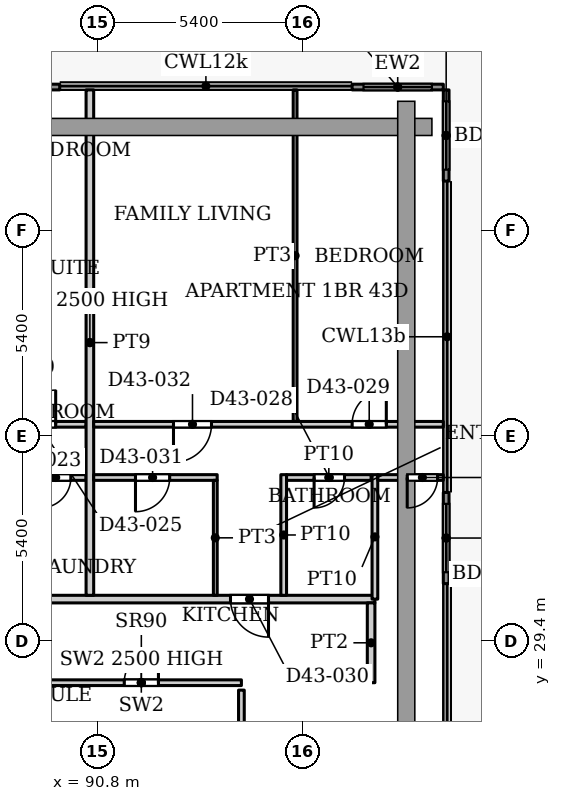
"""IFC4 building model, lengths in metres.
Left out: names, types, materials, properties, quantities, classifications, styles, units other than length and angle.
Written with IfcOpenShell. Run it as: python <this file> out.ifc"""

import sys

from ifc_helpers import new_model, si_unit, direction, frame, frame_2d, origin, place, context, subcontext, project, spatial, rectangle, extrude, source, transform, mapped, element, fill, save


model = new_model("IFC4")
c1 = context("Model", 3, precision=1e-05, world=origin(), true_north=direction((0.0, 1.0)))
c2 = subcontext(c1, "Body", "Model", "MODEL_VIEW")
j1 = project(units=[si_unit("LENGTHUNIT", "METRE"), si_unit("PLANEANGLEUNIT", "RADIAN")], contexts=[c1])
p1 = place(None, origin())
s1 = spatial("IfcSite", under=j1, at=p1, CompositionType="ELEMENT")
p2 = place(p1, origin())
s2 = spatial("IfcBuilding", under=s1, at=p2, CompositionType="ELEMENT")
p3 = place(p2, frame((0.0, 0.0, 183.8)))
s3 = spatial("IfcBuildingStorey", under=s2, at=p3, CompositionType="ELEMENT", Elevation=183.8)
p4 = place(p3, frame((87.406, 43.975, 0.0), z_axis=(0.0, 0.0, 1.0), x_axis=(1.0, 0.0, 0.0)))
e1 = element("IfcWall", 1, at=p4, inside=s3, PredefinedType="SOLIDWALL", context=c2, shape_type="SweptSolid", body=[
    extrude(rectangle(XDim=2.4, YDim=0.15, at=frame_2d((1.2, 0.0))), origin(), (0.0, 0.0, 1.0), 3.75),
])
p5 = place(p4, frame((0.3, 0.0, 0.0)))
e2 = element("IfcOpeningElement", 2, at=p5, cuts=e1, PredefinedType="OPENING", context=c2, shape_type="SweptSolid", body=[
    extrude(rectangle(XDim=1.8, YDim=2.4, at=frame_2d((0.9, 1.2))), frame((0.0, 0.085, 0.0), z_axis=(0.0, -1.0, 0.0), x_axis=(1.0, 0.0, 0.0)), (0.0, 0.0, 1.0), 0.17),
])
p6 = place(p3, frame((97.5, 43.975, 0.0), z_axis=(0.0, 0.0, 1.0), x_axis=(1.0, 0.0, 0.0)))
e3 = element("IfcWall", 3, at=p6, inside=s3, PredefinedType="SOLIDWALL", context=c2, shape_type="SweptSolid", body=[
    extrude(rectangle(XDim=2.4, YDim=0.15, at=frame_2d((1.2, 0.0))), origin(), (0.0, 0.0, 1.0), 3.75),
])
p7 = place(p6, frame((0.3, 0.0, 0.0)))
e4 = element("IfcOpeningElement", 4, at=p7, cuts=e3, PredefinedType="OPENING", context=c2, shape_type="SweptSolid", body=[
    extrude(rectangle(XDim=1.8, YDim=2.4, at=frame_2d((0.9, 1.2))), frame((0.0, 0.085, 0.0), z_axis=(0.0, -1.0, 0.0), x_axis=(1.0, 0.0, 0.0)), (0.0, 0.0, 1.0), 0.17),
])
p8 = place(p3, frame((99.975, 43.9, 0.0), z_axis=(0.0, 0.0, 1.0), x_axis=(0.0, -1.0, 0.0)))
e5 = element("IfcWall", 5, at=p8, inside=s3, PredefinedType="SOLIDWALL", context=c2, shape_type="SweptSolid", body=[
    extrude(rectangle(XDim=2.4, YDim=0.15, at=frame_2d((1.2, 0.0))), origin(), (0.0, 0.0, 1.0), 3.75),
])
p9 = place(p8, frame((0.3, 0.0, 0.0)))
e6 = element("IfcOpeningElement", 6, at=p9, cuts=e5, PredefinedType="OPENING", context=c2, shape_type="SweptSolid", body=[
    extrude(rectangle(XDim=1.8, YDim=2.4, at=frame_2d((0.9, 1.2))), frame((0.0, 0.085, 0.0), z_axis=(0.0, -1.0, 0.0), x_axis=(1.0, 0.0, 0.0)), (0.0, 0.0, 1.0), 0.17),
])
p10 = place(p3, frame((99.975, 33.307, 0.0), z_axis=(0.0, 0.0, 1.0), x_axis=(0.0, -1.0, 0.0)))
e7 = element("IfcWall", 7, at=p10, inside=s3, PredefinedType="SOLIDWALL", context=c2, shape_type="SweptSolid", body=[
    extrude(rectangle(XDim=2.4, YDim=0.15, at=frame_2d((1.2, 0.0))), origin(), (0.0, 0.0, 1.0), 3.75),
])
p11 = place(p10, frame((0.3, 0.0, 0.0)))
e8 = element("IfcOpeningElement", 8, at=p11, cuts=e7, PredefinedType="OPENING", context=c2, shape_type="SweptSolid", body=[
    extrude(rectangle(XDim=1.8, YDim=2.4, at=frame_2d((0.9, 1.2))), frame((0.0, 0.085, 0.0), z_axis=(0.0, -1.0, 0.0), x_axis=(1.0, 0.0, 0.0)), (0.0, 0.0, 1.0), 0.17),
])
p12 = place(p3, frame((89.32, 28.3, 0.0), z_axis=(0.0, 0.0, 1.0), x_axis=(1.0, 0.0, 0.0)))
e9 = element("IfcWall", 9, at=p12, inside=s3, PredefinedType="PARTITIONING", context=c2, shape_type="SweptSolid", body=[
    extrude(rectangle(XDim=5.267, YDim=0.15, at=frame_2d((2.633, 0.0))), origin(), (0.0, 0.0, 1.0), 2.5),
])
p13 = place(p12, frame((2.184, 0.0, 0.0)))
e10 = element("IfcOpeningElement", 10, at=p13, cuts=e9, PredefinedType="OPENING", context=c2, shape_type="SweptSolid", body=[
    extrude(rectangle(XDim=0.9, YDim=2.2, at=frame_2d((0.45, 1.1))), frame((0.0, 0.085, 0.0), z_axis=(0.0, -1.0, 0.0), x_axis=(1.0, 0.0, 0.0)), (0.0, 0.0, 1.0), 0.17),
])
p14 = place(p3, frame((94.587, 21.293, 0.0), z_axis=(0.0, 0.0, 1.0), x_axis=(0.0, 1.0, 0.0)))
e11 = element("IfcWall", 11, at=p14, inside=s3, PredefinedType="PARTITIONING", context=c2, shape_type="SweptSolid", body=[
    extrude(rectangle(XDim=6.812, YDim=0.15, at=frame_2d((3.406, 0.0))), origin(), (0.0, 0.0, 1.0), 3.9),
])
p15 = place(p3, frame((53.549, 30.5, 0.0), z_axis=(0.0, 0.0, 1.0), x_axis=(1.0, 0.0, 0.0)))
e12 = element("IfcWall", 12, at=p15, inside=s3, PredefinedType="PARTITIONING", context=c2, shape_type="SweptSolid", body=[
    extrude(rectangle(XDim=44.551, YDim=0.2, at=frame_2d((22.275, 0.0))), origin(), (0.0, 0.0, 1.0), 3.6),
])
p16 = place(p15, frame((8.351, 0.0, 0.0)))
e13 = element("IfcOpeningElement", 13, at=p16, cuts=e12, PredefinedType="OPENING", context=c2, shape_type="SweptSolid", body=[
    extrude(rectangle(XDim=1.0, YDim=2.1, at=frame_2d((0.5, 1.05))), frame((0.0, 0.11, 0.0), z_axis=(0.0, -1.0, 0.0), x_axis=(1.0, 0.0, 0.0)), (0.0, 0.0, 1.0), 0.22),
])
p17 = place(p15, frame((12.551, 0.0, 0.0)))
e14 = element("IfcOpeningElement", 14, at=p17, cuts=e12, PredefinedType="OPENING", context=c2, shape_type="SweptSolid", body=[
    extrude(rectangle(XDim=1.0, YDim=2.1, at=frame_2d((0.5, 1.05))), frame((0.0, 0.11, 0.0), z_axis=(0.0, -1.0, 0.0), x_axis=(1.0, 0.0, 0.0)), (0.0, 0.0, 1.0), 0.22),
])
p18 = place(p15, frame((28.751, 0.0, 0.0)))
e15 = element("IfcOpeningElement", 15, at=p18, cuts=e12, PredefinedType="OPENING", context=c2, shape_type="SweptSolid", body=[
    extrude(rectangle(XDim=1.0, YDim=2.1, at=frame_2d((0.5, 1.05))), frame((0.0, 0.11, 0.0), z_axis=(0.0, -1.0, 0.0), x_axis=(1.0, 0.0, 0.0)), (0.0, 0.0, 1.0), 0.22),
])
p19 = place(p15, frame((40.751, 0.0, 0.0)))
e16 = element("IfcOpeningElement", 16, at=p19, cuts=e12, PredefinedType="OPENING", context=c2, shape_type="SweptSolid", body=[
    extrude(rectangle(XDim=1.0, YDim=2.1, at=frame_2d((0.5, 1.05))), frame((0.0, 0.11, 0.0), z_axis=(0.0, -1.0, 0.0), x_axis=(1.0, 0.0, 0.0)), (0.0, 0.0, 1.0), 0.22),
])
p20 = place(p3, frame((79.0, 35.1, 0.0), z_axis=(0.0, 0.0, 1.0), x_axis=(1.0, 0.0, 0.0)))
e17 = element("IfcWall", 17, at=p20, inside=s3, PredefinedType="PARTITIONING", context=c2, shape_type="SweptSolid", body=[
    extrude(rectangle(XDim=11.5, YDim=0.15, at=frame_2d((5.75, 0.0))), origin(), (0.0, 0.0, 1.0), 3.6),
])
p21 = place(p20, frame((0.95, 0.0, 0.0)))
e18 = element("IfcOpeningElement", 18, at=p21, cuts=e17, PredefinedType="OPENING", context=c2, shape_type="SweptSolid", body=[
    extrude(rectangle(XDim=0.9, YDim=2.1, at=frame_2d((0.45, 1.05))), frame((0.0, 0.085, 0.0), z_axis=(0.0, -1.0, 0.0), x_axis=(1.0, 0.0, 0.0)), (0.0, 0.0, 1.0), 0.17),
])
p22 = place(p20, frame((4.35, 0.0, 0.0)))
e19 = element("IfcOpeningElement", 19, at=p22, cuts=e17, PredefinedType="OPENING", context=c2, shape_type="SweptSolid", body=[
    extrude(rectangle(XDim=1.0, YDim=2.1, at=frame_2d((0.5, 1.05))), frame((0.0, 0.085, 0.0), z_axis=(0.0, -1.0, 0.0), x_axis=(1.0, 0.0, 0.0)), (0.0, 0.0, 1.0), 0.17),
])
p23 = place(p20, frame((9.8, 0.0, 0.0)))
e20 = element("IfcOpeningElement", 20, at=p23, cuts=e17, PredefinedType="OPENING", context=c2, shape_type="SweptSolid", body=[
    extrude(rectangle(XDim=0.9, YDim=2.1, at=frame_2d((0.45, 1.05))), frame((0.0, 0.085, 0.0), z_axis=(0.0, -1.0, 0.0), x_axis=(1.0, 0.0, 0.0)), (0.0, 0.0, 1.0), 0.17),
])
p24 = place(p3, frame((83.625, 33.7, 0.0), z_axis=(0.0, 0.0, 1.0), x_axis=(1.0, 0.0, 0.0)))
e21 = element("IfcWall", 21, at=p24, inside=s3, PredefinedType="PARTITIONING", context=c2, shape_type="SweptSolid", body=[
    extrude(rectangle(XDim=6.875, YDim=0.15, at=frame_2d((3.438, 0.0))), origin(), (0.0, 0.0, 1.0), 3.6),
])
p25 = place(p24, frame((3.725, 0.0, 0.0)))
e22 = element("IfcOpeningElement", 22, at=p25, cuts=e21, PredefinedType="OPENING", context=c2, shape_type="SweptSolid", body=[
    extrude(rectangle(XDim=0.8, YDim=2.1, at=frame_2d((0.4, 1.05))), frame((0.0, 0.085, 0.0), z_axis=(0.0, -1.0, 0.0), x_axis=(1.0, 0.0, 0.0)), (0.0, 0.0, 1.0), 0.17),
])
p26 = place(p24, frame((5.675, 0.0, 0.0)))
e23 = element("IfcOpeningElement", 23, at=p26, cuts=e21, PredefinedType="OPENING", context=c2, shape_type="SweptSolid", body=[
    extrude(rectangle(XDim=0.8, YDim=2.1, at=frame_2d((0.4, 1.05))), frame((0.0, 0.085, 0.0), z_axis=(0.0, -1.0, 0.0), x_axis=(1.0, 0.0, 0.0)), (0.0, 0.0, 1.0), 0.17),
])
p27 = place(p24, frame((1.925, 0.0, 0.0)))
e24 = element("IfcOpeningElement", 24, at=p27, cuts=e21, PredefinedType="OPENING", context=c2, shape_type="SweptSolid", body=[
    extrude(rectangle(XDim=0.8, YDim=2.1, at=frame_2d((0.4, 1.05))), frame((0.0, 0.085, 0.0), z_axis=(0.0, -1.0, 0.0), x_axis=(1.0, 0.0, 0.0)), (0.0, 0.0, 1.0), 0.17),
])
p28 = place(p24, frame((0.425, 0.0, 0.0)))
e25 = element("IfcOpeningElement", 25, at=p28, cuts=e21, PredefinedType="OPENING", context=c2, shape_type="SweptSolid", body=[
    extrude(rectangle(XDim=0.8, YDim=2.1, at=frame_2d((0.4, 1.05))), frame((0.0, 0.085, 0.0), z_axis=(0.0, -1.0, 0.0), x_axis=(1.0, 0.0, 0.0)), (0.0, 0.0, 1.0), 0.17),
])
p29 = place(p3, frame((90.6, 30.6, 0.0), z_axis=(0.0, 0.0, 1.0), x_axis=(0.0, 1.0, 0.0)))
e26 = element("IfcWall", 26, at=p29, inside=s3, PredefinedType="PARTITIONING", context=c2, shape_type="SweptSolid", body=[
    extrude(rectangle(XDim=13.3, YDim=0.2, at=frame_2d((6.65, 0.0))), origin(), (0.0, 0.0, 1.0), 2.5),
])
p30 = place(p3, frame((90.7, 33.7, 0.0), z_axis=(0.0, 0.0, 1.0), x_axis=(1.0, 0.0, 0.0)))
e27 = element("IfcWall", 27, at=p30, inside=s3, PredefinedType="PARTITIONING", context=c2, shape_type="SweptSolid", body=[
    extrude(rectangle(XDim=3.25, YDim=0.15, at=frame_2d((1.625, 0.0))), origin(), (0.0, 0.0, 1.0), 3.6),
])
p31 = place(p30, frame((1.1, 0.0, 0.0)))
e28 = element("IfcOpeningElement", 28, at=p31, cuts=e27, PredefinedType="OPENING", context=c2, shape_type="SweptSolid", body=[
    extrude(rectangle(XDim=0.9, YDim=2.1, at=frame_2d((0.45, 1.05))), frame((0.0, 0.085, 0.0), z_axis=(0.0, -1.0, 0.0), x_axis=(1.0, 0.0, 0.0)), (0.0, 0.0, 1.0), 0.17),
])
p32 = place(p3, frame((90.7, 35.1, 0.0), z_axis=(0.0, 0.0, 1.0), x_axis=(1.0, 0.0, 0.0)))
e29 = element("IfcWall", 29, at=p32, inside=s3, PredefinedType="PARTITIONING", context=c2, shape_type="SweptSolid", body=[
    extrude(rectangle(XDim=9.2, YDim=0.15, at=frame_2d((4.6, 0.0))), origin(), (0.0, 0.0, 1.0), 3.6),
])
p33 = place(p32, frame((6.8, 0.0, 0.0)))
e30 = element("IfcOpeningElement", 30, at=p33, cuts=e29, PredefinedType="OPENING", context=c2, shape_type="SweptSolid", body=[
    extrude(rectangle(XDim=0.9, YDim=2.1, at=frame_2d((0.45, 1.05))), frame((0.0, 0.085, 0.0), z_axis=(0.0, -1.0, 0.0), x_axis=(1.0, 0.0, 0.0)), (0.0, 0.0, 1.0), 0.17),
])
p34 = place(p32, frame((2.1, 0.0, 0.0)))
e31 = element("IfcOpeningElement", 31, at=p34, cuts=e29, PredefinedType="OPENING", context=c2, shape_type="SweptSolid", body=[
    extrude(rectangle(XDim=1.0, YDim=2.1, at=frame_2d((0.5, 1.05))), frame((0.0, 0.085, 0.0), z_axis=(0.0, -1.0, 0.0), x_axis=(1.0, 0.0, 0.0)), (0.0, 0.0, 1.0), 0.17),
])
p35 = place(p3, frame((93.9, 30.6, 0.0), z_axis=(0.0, 0.0, 1.0), x_axis=(0.0, 1.0, 0.0)))
e32 = element("IfcWall", 32, at=p35, inside=s3, PredefinedType="PARTITIONING", context=c2, shape_type="SweptSolid", body=[
    extrude(rectangle(XDim=3.025, YDim=0.1, at=frame_2d((1.512, 0.0))), origin(), (0.0, 0.0, 1.0), 3.6),
])
p36 = place(p3, frame((95.7, 30.6, 0.0), z_axis=(0.0, 0.0, 1.0), x_axis=(0.0, 1.0, 0.0)))
e33 = element("IfcWall", 33, at=p36, inside=s3, PredefinedType="PARTITIONING", context=c2, shape_type="SweptSolid", body=[
    extrude(rectangle(XDim=3.175, YDim=0.15, at=frame_2d((1.587, 0.0))), origin(), (0.0, 0.0, 1.0), 3.6),
])
p37 = place(p3, frame((95.775, 33.7, 0.0), z_axis=(0.0, 0.0, 1.0), x_axis=(1.0, 0.0, 0.0)))
e34 = element("IfcWall", 34, at=p37, inside=s3, PredefinedType="PARTITIONING", context=c2, shape_type="SweptSolid", body=[
    extrude(rectangle(XDim=2.225, YDim=0.15, at=frame_2d((1.113, 0.0))), origin(), (0.0, 0.0, 1.0), 3.6),
])
p38 = place(p37, frame((0.725, 0.0, 0.0)))
e35 = element("IfcOpeningElement", 35, at=p38, cuts=e34, PredefinedType="OPENING", context=c2, shape_type="SweptSolid", body=[
    extrude(rectangle(XDim=0.8, YDim=2.1, at=frame_2d((0.4, 1.05))), frame((0.0, 0.085, 0.0), z_axis=(0.0, -1.0, 0.0), x_axis=(1.0, 0.0, 0.0)), (0.0, 0.0, 1.0), 0.17),
])
p39 = place(p3, frame((96.0, 35.175, 0.0), z_axis=(0.0, 0.0, 1.0), x_axis=(0.0, 1.0, 0.0)))
e36 = element("IfcWall", 36, at=p39, inside=s3, PredefinedType="PARTITIONING", context=c2, shape_type="SweptSolid", body=[
    extrude(rectangle(XDim=8.725, YDim=0.1, at=frame_2d((4.362, 0.0))), origin(), (0.0, 0.0, 1.0), 3.6),
])
p40 = place(p3, frame((98.0, 28.3, 0.0), z_axis=(0.0, 0.0, 1.0), x_axis=(0.0, 1.0, 0.0)))
e37 = element("IfcWall", 37, at=p40, inside=s3, PredefinedType="PARTITIONING", context=c2, shape_type="SweptSolid", body=[
    extrude(rectangle(XDim=2.1, YDim=0.2, at=frame_2d((1.05, 0.0))), origin(), (0.0, 0.0, 1.0), 3.6),
])
p41 = place(p3, frame((98.1, 30.5, 0.0), z_axis=(0.0, 0.0, 1.0), x_axis=(0.0, 1.0, 0.0)))
e38 = element("IfcWall", 38, at=p41, inside=s3, PredefinedType="PARTITIONING", context=c2, shape_type="SweptSolid", body=[
    extrude(rectangle(XDim=3.275, YDim=0.15, at=frame_2d((1.637, 0.0))), origin(), (0.0, 0.0, 1.0), 3.6),
])
p42 = place(p3, frame((98.175, 33.7, 0.0), z_axis=(0.0, 0.0, 1.0), x_axis=(1.0, 0.0, 0.0)))
e39 = element("IfcWall", 39, at=p42, inside=s3, PredefinedType="PARTITIONING", context=c2, shape_type="SweptSolid", body=[
    extrude(rectangle(XDim=1.725, YDim=0.15, at=frame_2d((0.862, 0.0))), origin(), (0.0, 0.0, 1.0), 3.6),
])
p43 = place(p42, frame((0.775, 0.0, 0.0)))
e40 = element("IfcOpeningElement", 40, at=p43, cuts=e39, PredefinedType="OPENING", context=c2, shape_type="SweptSolid", body=[
    extrude(rectangle(XDim=0.8, YDim=2.1, at=frame_2d((0.4, 1.05))), frame((0.0, 0.085, 0.0), z_axis=(0.0, -1.0, 0.0), x_axis=(1.0, 0.0, 0.0)), (0.0, 0.0, 1.0), 0.17),
])
m1 = source(origin(), c2, "Body", "SweptSolid", [
    extrude(rectangle(XDim=1.8, YDim=2.4, at=frame_2d((0.9, 1.2))), frame((0.0, 0.025, 0.0), z_axis=(0.0, -1.0, 0.0), x_axis=(1.0, 0.0, 0.0)), (0.0, 0.0, 1.0), 0.05),
])
p44 = place(p7, origin())
e41 = element("IfcDoor", 41, at=p44, inside=s3, OperationType="SLIDING_TO_LEFT", PredefinedType="DOOR", context=c2, shape_type="MappedRepresentation", body=[
    mapped(m1, transform((0.0, 0.0, 0.0), x_axis=(1.0, 0.0, 0.0), y_axis=(0.0, 1.0, 0.0), z_axis=(0.0, 0.0, 1.0), scale=1.0)),
])
fill(e4, e41)
p45 = place(p9, origin())
e42 = element("IfcDoor", 42, at=p45, inside=s3, OperationType="SLIDING_TO_LEFT", PredefinedType="DOOR", context=c2, shape_type="MappedRepresentation", body=[
    mapped(m1, transform((0.0, 0.0, 0.0), x_axis=(1.0, 0.0, 0.0), y_axis=(0.0, 1.0, 0.0), z_axis=(0.0, 0.0, 1.0), scale=1.0)),
])
fill(e6, e42)
p46 = place(p11, origin())
e43 = element("IfcDoor", 43, at=p46, inside=s3, OperationType="SLIDING_TO_LEFT", PredefinedType="DOOR", context=c2, shape_type="MappedRepresentation", body=[
    mapped(m1, transform((0.0, 0.0, 0.0), x_axis=(1.0, 0.0, 0.0), y_axis=(0.0, 1.0, 0.0), z_axis=(0.0, 0.0, 1.0), scale=1.0)),
])
fill(e8, e43)
m2 = source(origin(), c2, "Body", "SweptSolid", [
    extrude(rectangle(XDim=0.9, YDim=2.2, at=frame_2d((0.45, 1.1))), frame((0.0, 0.025, 0.0), z_axis=(0.0, -1.0, 0.0), x_axis=(1.0, 0.0, 0.0)), (0.0, 0.0, 1.0), 0.05),
])
p47 = place(p13, origin())
e44 = element("IfcDoor", 44, at=p47, inside=s3, OperationType="SINGLE_SWING_LEFT", PredefinedType="DOOR", context=c2, shape_type="MappedRepresentation", body=[
    mapped(m2, transform((0.0, 0.0, 0.0), x_axis=(1.0, 0.0, 0.0), y_axis=(0.0, 1.0, 0.0), z_axis=(0.0, 0.0, 1.0), scale=1.0)),
])
fill(e10, e44)
m3 = source(origin(), c2, "Body", "SweptSolid", [
    extrude(rectangle(XDim=0.8, YDim=2.1, at=frame_2d((0.4, 1.05))), frame((0.0, 0.025, 0.0), z_axis=(0.0, -1.0, 0.0), x_axis=(1.0, 0.0, 0.0)), (0.0, 0.0, 1.0), 0.05),
])
p48 = place(p26, origin())
e45 = element("IfcDoor", 45, at=p48, inside=s3, OperationType="SINGLE_SWING_RIGHT", PredefinedType="DOOR", context=c2, shape_type="MappedRepresentation", body=[
    mapped(m3, transform((0.0, 0.0, 0.0), x_axis=(1.0, 0.0, 0.0), y_axis=(0.0, 1.0, 0.0), z_axis=(0.0, 0.0, 1.0), scale=1.0)),
])
fill(e23, e45)
m4 = source(origin(), c2, "Body", "SweptSolid", [
    extrude(rectangle(XDim=0.9, YDim=2.1, at=frame_2d((0.45, 1.05))), frame((0.0, 0.025, 0.0), z_axis=(0.0, -1.0, 0.0), x_axis=(1.0, 0.0, 0.0)), (0.0, 0.0, 1.0), 0.05),
])
p49 = place(p23, origin())
e46 = element("IfcDoor", 46, at=p49, inside=s3, OperationType="SINGLE_SWING_LEFT", PredefinedType="DOOR", context=c2, shape_type="MappedRepresentation", body=[
    mapped(m4, transform((0.0, 0.0, 0.0), x_axis=(1.0, 0.0, 0.0), y_axis=(0.0, 1.0, 0.0), z_axis=(0.0, 0.0, 1.0), scale=1.0)),
])
fill(e20, e46)
p50 = place(p38, origin())
e47 = element("IfcDoor", 47, at=p50, inside=s3, OperationType="SINGLE_SWING_RIGHT", PredefinedType="DOOR", context=c2, shape_type="MappedRepresentation", body=[
    mapped(m3, transform((0.0, 0.0, 0.0), x_axis=(1.0, 0.0, 0.0), y_axis=(0.0, 1.0, 0.0), z_axis=(0.0, 0.0, 1.0), scale=1.0)),
])
fill(e35, e47)
p51 = place(p33, origin())
e48 = element("IfcDoor", 48, at=p51, inside=s3, OperationType="SINGLE_SWING_LEFT", PredefinedType="DOOR", context=c2, shape_type="MappedRepresentation", body=[
    mapped(m4, transform((0.0, 0.0, 0.0), x_axis=(1.0, 0.0, 0.0), y_axis=(0.0, 1.0, 0.0), z_axis=(0.0, 0.0, 1.0), scale=1.0)),
])
fill(e30, e48)
m5 = source(origin(), c2, "Body", "SweptSolid", [
    extrude(rectangle(XDim=1.0, YDim=2.1, at=frame_2d((0.5, 1.05))), frame((0.0, 0.025, 0.0), z_axis=(0.0, -1.0, 0.0), x_axis=(1.0, 0.0, 0.0)), (0.0, 0.0, 1.0), 0.05),
])
p52 = place(p19, origin())
e49 = element("IfcDoor", 49, at=p52, inside=s3, OperationType="SINGLE_SWING_RIGHT", PredefinedType="DOOR", context=c2, shape_type="MappedRepresentation", body=[
    mapped(m5, transform((0.0, 0.0, 0.0), x_axis=(1.0, 0.0, 0.0), y_axis=(0.0, 1.0, 0.0), z_axis=(0.0, 0.0, 1.0), scale=1.0)),
])
fill(e16, e49)
p53 = place(p31, origin())
e50 = element("IfcDoor", 50, at=p53, inside=s3, OperationType="SINGLE_SWING_RIGHT", PredefinedType="DOOR", context=c2, shape_type="MappedRepresentation", body=[
    mapped(m4, transform((0.0, 0.0, 0.0), x_axis=(1.0, 0.0, 0.0), y_axis=(0.0, 1.0, 0.0), z_axis=(0.0, 0.0, 1.0), scale=1.0)),
])
fill(e28, e50)
m6 = source(origin(), c2, "Body", "SweptSolid", [
    extrude(rectangle(XDim=1.0, YDim=2.1, at=frame_2d((0.5, 1.05))), frame((0.0, 0.025, 0.0), z_axis=(0.0, -1.0, 0.0), x_axis=(1.0, 0.0, 0.0)), (0.0, 0.0, 1.0), 0.05),
])
p54 = place(p34, origin())
e51 = element("IfcDoor", 51, at=p54, inside=s3, OperationType="SINGLE_SWING_RIGHT", PredefinedType="DOOR", context=c2, shape_type="MappedRepresentation", body=[
    mapped(m6, transform((0.0, 0.0, 0.0), x_axis=(1.0, 0.0, 0.0), y_axis=(0.0, 1.0, 0.0), z_axis=(0.0, 0.0, 1.0), scale=1.0)),
])
fill(e31, e51)
p55 = place(p43, origin())
e52 = element("IfcDoor", 52, at=p55, inside=s3, OperationType="SINGLE_SWING_RIGHT", PredefinedType="DOOR", context=c2, shape_type="MappedRepresentation", body=[
    mapped(m3, transform((0.0, 0.0, 0.0), x_axis=(1.0, 0.0, 0.0), y_axis=(0.0, 1.0, 0.0), z_axis=(0.0, 0.0, 1.0), scale=1.0)),
])
fill(e40, e52)
save(model, sys.argv[1])
